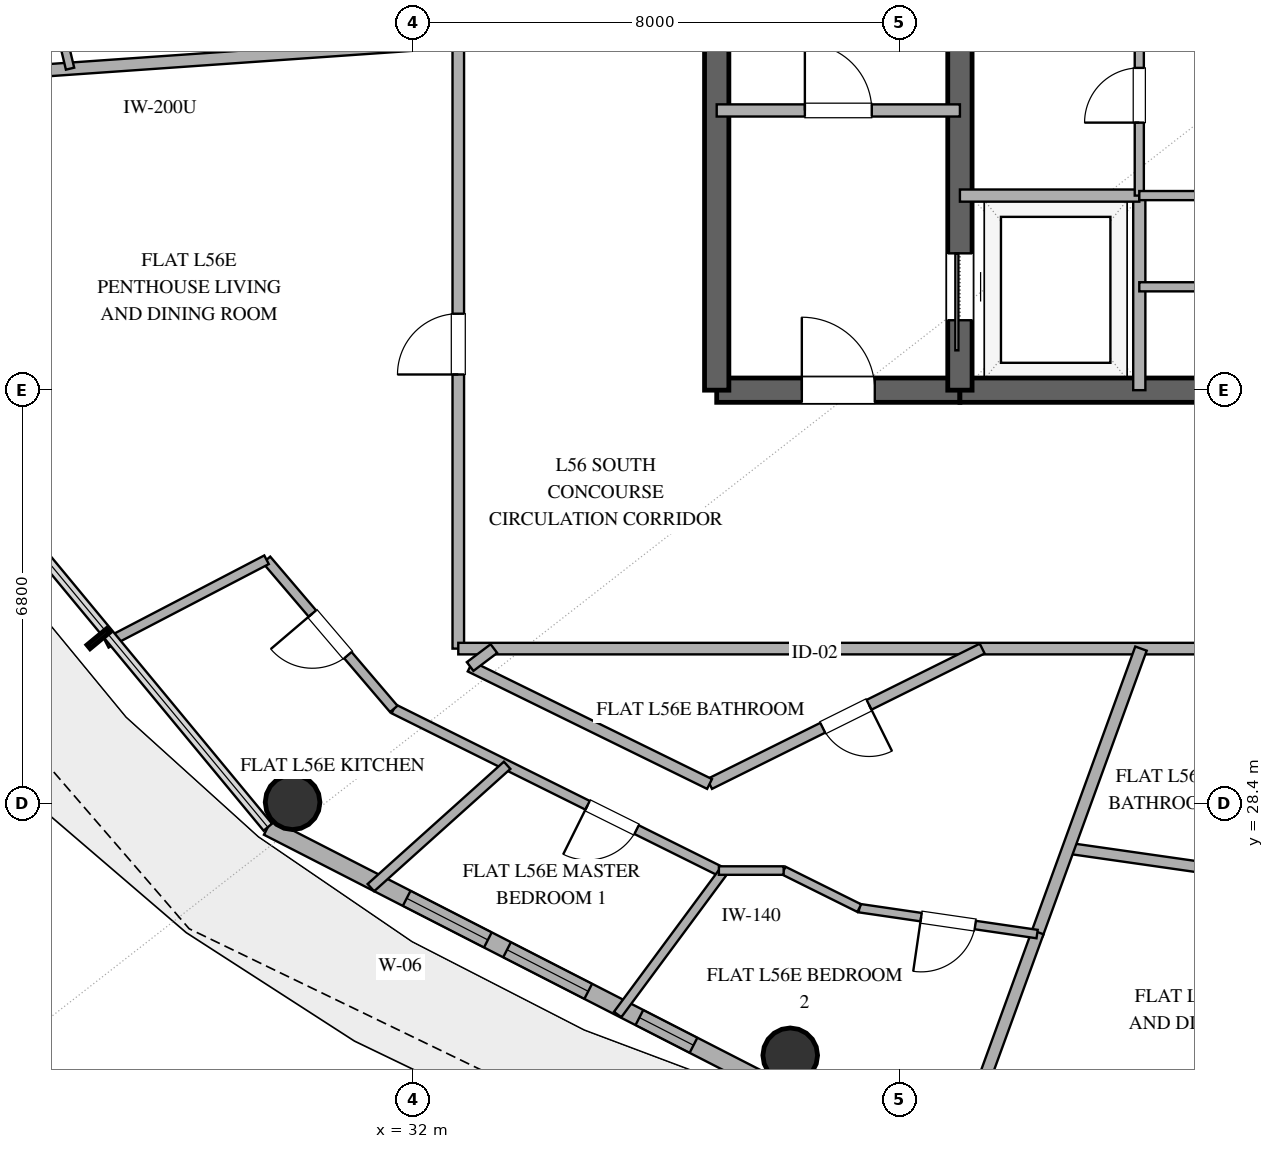
"""IFC4 building model, lengths in metres.
Left out: names, types, materials, properties, quantities, classifications, styles, units other than length and angle.
Written with IfcOpenShell. Run it as: python <this file> out.ifc"""

import sys

from ifc_helpers import new_model, si_unit, direction, frame, frame_2d, origin, origin_2d, place, context, subcontext, project, spatial, rectangle, hollow_circle, extrude, element, fill, save


model = new_model("IFC4")
c1 = context("Model", 3, precision=1e-05, world=origin(), true_north=direction((0.0, 1.0)))
c2 = subcontext(c1, "Body", "Model", "MODEL_VIEW")
j1 = project(units=[si_unit("LENGTHUNIT", "METRE"), si_unit("PLANEANGLEUNIT", "RADIAN")], contexts=[c1])
p1 = place(None, origin())
s1 = spatial("IfcSite", under=j1, at=p1, CompositionType="ELEMENT")
p2 = place(p1, origin())
s2 = spatial("IfcBuilding", under=s1, at=p2, CompositionType="ELEMENT")
p3 = place(p2, frame((0.0, 0.0, 220.8)))
s3 = spatial("IfcBuildingStorey", under=s2, at=p3, CompositionType="ELEMENT", Elevation=220.8)
p4 = place(p3, frame((37.0, 35.2, 0.0), z_axis=(0.0, 0.0, 1.0), x_axis=(1.0, 0.0, 0.0)))
e1 = element("IfcWall", 1, at=p4, inside=s3, PredefinedType="SHEAR", context=c2, shape_type="SweptSolid", body=[
    extrude(rectangle(XDim=4.0, YDim=0.4, at=frame_2d((2.0, 0.0))), origin(), (0.0, 0.0, 1.0), 3.36),
])
p5 = place(p4, frame((1.4, 0.0, 0.0)))
e2 = element("IfcOpeningElement", 2, at=p5, cuts=e1, PredefinedType="OPENING", context=c2, shape_type="SweptSolid", body=[
    extrude(rectangle(XDim=1.2, YDim=2.15, at=frame_2d((0.6, 1.075))), frame((0.0, 0.21, 0.0), z_axis=(0.0, -1.0, 0.0), x_axis=(1.0, 0.0, 0.0)), (0.0, 0.0, 1.0), 0.42),
])
p6 = place(p3, frame((41.0, 35.2, 0.0), z_axis=(0.0, 0.0, 1.0), x_axis=(1.0, 0.0, 0.0)))
e3 = element("IfcWall", 3, at=p6, inside=s3, PredefinedType="SHEAR", context=c2, shape_type="SweptSolid", body=[
    extrude(rectangle(XDim=14.0, YDim=0.4, at=frame_2d((7.0, 0.0))), origin(), (0.0, 0.0, 1.0), 3.36),
])
p7 = place(p6, frame((6.1, 0.0, 0.0)))
e4 = element("IfcOpeningElement", 4, at=p7, cuts=e3, PredefinedType="OPENING", context=c2, shape_type="SweptSolid", body=[
    extrude(rectangle(XDim=1.8, YDim=2.25, at=frame_2d((0.9, 1.125))), frame((0.0, 0.21, 0.0), z_axis=(0.0, -1.0, 0.0), x_axis=(1.0, 0.0, 0.0)), (0.0, 0.0, 1.0), 0.42),
])
p8 = place(p3, frame((37.0, 35.2, 0.0), z_axis=(0.0, 0.0, 1.0), x_axis=(0.0, 1.0, 0.0)))
e5 = element("IfcWall", 5, at=p8, inside=s3, PredefinedType="SHEAR", context=c2, shape_type="SweptSolid", body=[
    extrude(rectangle(XDim=13.6, YDim=0.4, at=frame_2d((6.8, 0.0))), origin(), (0.0, 0.0, 1.0), 3.36),
])
p9 = place(p3, frame((41.0, 35.2, 0.0), z_axis=(0.0, 0.0, 1.0), x_axis=(0.0, 1.0, 0.0)))
e6 = element("IfcWall", 6, at=p9, inside=s3, PredefinedType="SHEAR", context=c2, shape_type="SweptSolid", body=[
    extrude(rectangle(XDim=13.6, YDim=0.4, at=frame_2d((6.8, 0.0))), origin(), (0.0, 0.0, 1.0), 3.36),
])
p10 = place(p9, frame((1.15, 0.0, 0.0)))
e7 = element("IfcOpeningElement", 7, at=p10, cuts=e6, PredefinedType="OPENING", context=c2, shape_type="SweptSolid", body=[
    extrude(rectangle(XDim=1.1, YDim=2.2, at=frame_2d((0.55, 1.1))), frame((0.0, 0.21, 0.0), z_axis=(0.0, -1.0, 0.0), x_axis=(1.0, 0.0, 0.0)), (0.0, 0.0, 1.0), 0.42),
])
for number, where, z_axis, x_axis in (
    (8, (30.025, 28.424, 0.0), (0.0, 0.0, 1.0), (1.0, 0.0, 0.0)),
    (9, (38.209, 24.261, 0.0), (0.0, 0.0, 1.0), (1.0, 0.0, 0.0)),
):
    element("IfcColumn", number, at=place(p3, frame(where, z_axis=z_axis, x_axis=x_axis)), inside=s3, PredefinedType="COLUMN", context=c2, shape_type="SweptSolid", body=[
        extrude(hollow_circle(Radius=0.45, WallThickness=0.025, at=origin_2d()), origin(), (0.0, 0.0, 1.0), 3.36),
    ])
p11 = place(p3, frame((29.617, 28.013, 0.0), z_axis=(0.0, 0.0, 1.0), x_axis=(0.890007394051, -0.455946091699, 0.0)))
e10 = element("IfcWall", 10, at=p11, inside=s3, PredefinedType="SOLIDWALL", context=c2, shape_type="SweptSolid", body=[
    extrude(rectangle(XDim=9.404, YDim=0.28, at=frame_2d((4.702, 0.0))), origin(), (0.0, 0.0, 1.0), 3.36),
])
p12 = place(p11, frame((2.566, 0.0, 0.85)))
e11 = element("IfcOpeningElement", 11, at=p12, cuts=e10, PredefinedType="OPENING", context=c2, shape_type="SweptSolid", body=[
    extrude(rectangle(XDim=1.5, YDim=2.0, at=frame_2d((0.75, 1.0))), frame((0.0, 0.15, 0.0), z_axis=(0.0, -1.0, 0.0), x_axis=(1.0, 0.0, 0.0)), (0.0, 0.0, 1.0), 0.3),
])
p13 = place(p11, frame((4.421, 0.0, 0.85)))
e12 = element("IfcOpeningElement", 12, at=p13, cuts=e10, PredefinedType="OPENING", context=c2, shape_type="SweptSolid", body=[
    extrude(rectangle(XDim=1.5, YDim=2.0, at=frame_2d((0.75, 1.0))), frame((0.0, 0.15, 0.0), z_axis=(0.0, -1.0, 0.0), x_axis=(1.0, 0.0, 0.0)), (0.0, 0.0, 1.0), 0.3),
])
p14 = place(p11, frame((6.866, 0.0, 0.85)))
e13 = element("IfcOpeningElement", 13, at=p14, cuts=e10, PredefinedType="OPENING", context=c2, shape_type="SweptSolid", body=[
    extrude(rectangle(XDim=1.0, YDim=1.8, at=frame_2d((0.5, 0.9))), frame((0.0, 0.15, 0.0), z_axis=(0.0, -1.0, 0.0), x_axis=(1.0, 0.0, 0.0)), (0.0, 0.0, 1.0), 0.3),
])
p15 = place(p3, frame((37.0, 39.8, 0.0), z_axis=(0.0, 0.0, 1.0), x_axis=(1.0, 0.0, 0.0)))
e14 = element("IfcWall", 14, at=p15, inside=s3, PredefinedType="SOLIDWALL", context=c2, shape_type="SweptSolid", body=[
    extrude(rectangle(XDim=4.0, YDim=0.2, at=frame_2d((2.0, 0.0))), origin(), (0.0, 0.0, 1.0), 2.72),
])
p16 = place(p15, frame((1.45, 0.0, 0.0)))
e15 = element("IfcOpeningElement", 15, at=p16, cuts=e14, PredefinedType="OPENING", context=c2, shape_type="SweptSolid", body=[
    extrude(rectangle(XDim=1.1, YDim=2.15, at=frame_2d((0.55, 1.075))), frame((0.0, 0.11, 0.0), z_axis=(0.0, -1.0, 0.0), x_axis=(1.0, 0.0, 0.0)), (0.0, 0.0, 1.0), 0.22),
])
p17 = place(p3, frame((43.95, 35.2, 0.0), z_axis=(0.0, 0.0, 1.0), x_axis=(0.0, 1.0, 0.0)))
e16 = element("IfcWall", 16, at=p17, inside=s3, PredefinedType="SOLIDWALL", context=c2, shape_type="SweptSolid", body=[
    extrude(rectangle(XDim=3.2, YDim=0.2, at=frame_2d((1.6, 0.0))), origin(), (0.0, 0.0, 1.0), 2.72),
])
p18 = place(p3, frame((41.0, 38.4, 0.0), z_axis=(0.0, 0.0, 1.0), x_axis=(1.0, 0.0, 0.0)))
e17 = element("IfcWall", 17, at=p18, inside=s3, PredefinedType="SOLIDWALL", context=c2, shape_type="SweptSolid", body=[
    extrude(rectangle(XDim=2.95, YDim=0.2, at=frame_2d((1.475, 0.0))), origin(), (0.0, 0.0, 1.0), 2.72),
])
p19 = place(p3, frame((43.95, 38.4, 0.0), z_axis=(0.0, 0.0, 1.0), x_axis=(0.0, 1.0, 0.0)))
e18 = element("IfcWall", 18, at=p19, inside=s3, PredefinedType="PARTITIONING", context=c2, shape_type="SweptSolid", body=[
    extrude(rectangle(XDim=3.4, YDim=0.15, at=frame_2d((1.7, 0.0))), origin(), (0.0, 0.0, 1.0), 2.72),
])
p20 = place(p19, frame((1.2, 0.0, 0.0)))
e19 = element("IfcOpeningElement", 19, at=p20, cuts=e18, PredefinedType="OPENING", context=c2, shape_type="SweptSolid", body=[
    extrude(rectangle(XDim=0.9, YDim=2.15, at=frame_2d((0.45, 1.075))), frame((0.0, 0.085, 0.0), z_axis=(0.0, -1.0, 0.0), x_axis=(1.0, 0.0, 0.0)), (0.0, 0.0, 1.0), 0.17),
])
for number, where, z_axis, x_axis in (
    (20, (43.95, 36.9, 0.0), (0.0, 0.0, 1.0), (1.0, 0.0, 0.0)),
    (21, (43.95, 38.4, 0.0), (0.0, 0.0, 1.0), (1.0, 0.0, 0.0)),
):
    element("IfcWall", number, at=place(p3, frame(where, z_axis=z_axis, x_axis=x_axis)), inside=s3, PredefinedType="PARTITIONING", context=c2, shape_type="SweptSolid", body=[
        extrude(rectangle(XDim=2.05, YDim=0.15, at=frame_2d((1.025, 0.0))), origin(), (0.0, 0.0, 1.0), 2.72),
    ])
p21 = place(p3, frame((32.75, 30.95, 0.0), z_axis=(0.0, 0.0, 1.0), x_axis=(0.0, 1.0, 0.0)))
e22 = element("IfcWall", 22, at=p21, inside=s3, PredefinedType="PARTITIONING", context=c2, shape_type="SweptSolid", body=[
    extrude(rectangle(XDim=12.471, YDim=0.19, at=frame_2d((6.236, 0.0))), origin(), (0.0, 0.0, 1.0), 2.72),
])
p22 = place(p21, frame((4.508, 0.0, 0.0)))
e23 = element("IfcOpeningElement", 23, at=p22, cuts=e22, PredefinedType="OPENING", context=c2, shape_type="SweptSolid", body=[
    extrude(rectangle(XDim=1.0, YDim=2.2, at=frame_2d((0.5, 1.1))), frame((0.0, 0.105, 0.0), z_axis=(0.0, -1.0, 0.0), x_axis=(1.0, 0.0, 0.0)), (0.0, 0.0, 1.0), 0.21),
])
p23 = place(p3, frame((45.87, 30.95, 0.0), z_axis=(0.0, 0.0, 1.0), x_axis=(-1.0, 0.0, 0.0)))
e24 = element("IfcWall", 24, at=p23, inside=s3, PredefinedType="PARTITIONING", context=c2, shape_type="SweptSolid", body=[
    extrude(rectangle(XDim=13.12, YDim=0.19, at=frame_2d((6.56, 0.0))), origin(), (0.0, 0.0, 1.0), 2.72),
])
p24 = place(p3, frame((32.75, 40.934, 0.0), z_axis=(0.0, 0.0, 1.0), x_axis=(-0.997563620801, -0.069762615023, 0.0)))
e25 = element("IfcWall", 25, at=p24, inside=s3, PredefinedType="PARTITIONING", context=c2, shape_type="SweptSolid", body=[
    extrude(rectangle(XDim=9.935, YDim=0.2, at=frame_2d((4.968, 0.0))), origin(), (0.0, 0.0, 1.0), 2.72),
])
p25 = place(p3, frame((41.366, 30.95, 0.0), z_axis=(0.0, 0.0, 1.0), x_axis=(-0.895701232799, -0.444656385946, 0.0)))
e26 = element("IfcWall", 26, at=p25, inside=s3, PredefinedType="PLUMBINGWALL", context=c2, shape_type="SweptSolid", body=[
    extrude(rectangle(XDim=5.006, YDim=0.18, at=frame_2d((2.503, 0.0))), origin(), (0.0, 0.0, 1.0), 2.72),
])
p26 = place(p25, frame((2.078, 0.0, 0.0)))
e27 = element("IfcOpeningElement", 27, at=p26, cuts=e26, PredefinedType="OPENING", context=c2, shape_type="SweptSolid", body=[
    extrude(rectangle(XDim=0.85, YDim=2.1, at=frame_2d((0.425, 1.05))), frame((0.0, 0.1, 0.0), z_axis=(0.0, -1.0, 0.0), x_axis=(1.0, 0.0, 0.0)), (0.0, 0.0, 1.0), 0.2),
])
p27 = place(p3, frame((36.882, 28.724, 0.0), z_axis=(0.0, 0.0, 1.0), x_axis=(-0.897797301304, 0.440408907461, 0.0)))
e28 = element("IfcWall", 28, at=p27, inside=s3, PredefinedType="PLUMBINGWALL", context=c2, shape_type="SweptSolid", body=[
    extrude(rectangle(XDim=4.385, YDim=0.18, at=frame_2d((2.193, 0.0))), origin(), (0.0, 0.0, 1.0), 2.72),
])
p28 = place(p3, frame((37.036, 27.3, 0.0), z_axis=(0.0, 0.0, 1.0), x_axis=(-0.895471406875, 0.445119039661, 0.0)))
e29 = element("IfcWall", 29, at=p28, inside=s3, PredefinedType="PLUMBINGWALL", context=c2, shape_type="SweptSolid", body=[
    extrude(rectangle(XDim=5.971, YDim=0.16, at=frame_2d((2.986, 0.0))), origin(), (0.0, 0.0, 1.0), 2.72),
])
p29 = place(p28, frame((1.512, 0.0, 0.0)))
e30 = element("IfcOpeningElement", 30, at=p29, cuts=e29, PredefinedType="OPENING", context=c2, shape_type="SweptSolid", body=[
    extrude(rectangle(XDim=0.9, YDim=2.1, at=frame_2d((0.45, 1.05))), frame((0.0, 0.09, 0.0), z_axis=(0.0, -1.0, 0.0), x_axis=(1.0, 0.0, 0.0)), (0.0, 0.0, 1.0), 0.18),
])
p30 = place(p3, frame((42.783, 27.666, 0.0), z_axis=(0.0, 0.0, 1.0), x_axis=(0.989925187984, -0.141591391669, 0.0)))
e31 = element("IfcWall", 31, at=p30, inside=s3, PredefinedType="PLUMBINGWALL", context=c2, shape_type="SweptSolid", body=[
    extrude(rectangle(XDim=3.819, YDim=0.18, at=frame_2d((1.91, 0.0))), origin(), (0.0, 0.0, 1.0), 2.72),
])
p31 = place(p3, frame((43.978, 30.95, 0.0), z_axis=(0.0, 0.0, 1.0), x_axis=(-0.34200203284, -0.939699212266, 0.0)))
e32 = element("IfcWall", 32, at=p31, inside=s3, PredefinedType="PARTITIONING", context=c2, shape_type="SweptSolid", body=[
    extrude(rectangle(XDim=4.996, YDim=0.2, at=frame_2d((2.498, 0.0))), origin(), (0.0, 0.0, 1.0), 2.72),
])
p32 = place(p3, frame((41.133, 23.134, 0.0), z_axis=(0.0, 0.0, 1.0), x_axis=(0.342000121366, 0.939699907942, 0.0)))
e33 = element("IfcWall", 33, at=p32, inside=s3, PredefinedType="PARTITIONING", context=c2, shape_type="SweptSolid", body=[
    extrude(rectangle(XDim=3.355, YDim=0.2, at=frame_2d((1.678, 0.0))), origin(), (0.0, 0.0, 1.0), 2.72),
])
p33 = place(p3, frame((31.689, 29.958, 0.0), z_axis=(0.0, 0.0, 1.0), x_axis=(-0.649012353166, 0.760777868657, 0.0)))
e34 = element("IfcWall", 34, at=p33, inside=s3, PredefinedType="PLUMBINGWALL", context=c2, shape_type="SweptSolid", body=[
    extrude(rectangle(XDim=3.224, YDim=0.16, at=frame_2d((1.612, 0.0))), origin(), (0.0, 0.0, 1.0), 2.72),
])
p34 = place(p33, frame((1.162, 0.0, 0.0)))
e35 = element("IfcOpeningElement", 35, at=p34, cuts=e34, PredefinedType="OPENING", context=c2, shape_type="SweptSolid", body=[
    extrude(rectangle(XDim=0.9, YDim=2.1, at=frame_2d((0.45, 1.05))), frame((0.0, 0.09, 0.0), z_axis=(0.0, -1.0, 0.0), x_axis=(1.0, 0.0, 0.0)), (0.0, 0.0, 1.0), 0.18),
])
p35 = place(p3, frame((31.312, 27.019, 0.0), z_axis=(0.0, 0.0, 1.0), x_axis=(0.744144111532, 0.668019117445, 0.0)))
e36 = element("IfcWall", 36, at=p35, inside=s3, PredefinedType="PLUMBINGWALL", context=c2, shape_type="SweptSolid", body=[
    extrude(rectangle(XDim=3.011, YDim=0.16, at=frame_2d((1.506, 0.0))), origin(), (0.0, 0.0, 1.0), 2.72),
])
p36 = place(p3, frame((29.596, 32.411, 0.0), z_axis=(0.0, 0.0, 1.0), x_axis=(-0.886874801181, -0.462009834344, 0.0)))
e37 = element("IfcWall", 37, at=p36, inside=s3, PredefinedType="PLUMBINGWALL", context=c2, shape_type="SweptSolid", body=[
    extrude(rectangle(XDim=2.971, YDim=0.16, at=frame_2d((1.485, 0.0))), origin(), (0.0, 0.0, 1.0), 2.72),
])
p37 = place(p3, frame((42.27, 26.256, 0.0), z_axis=(0.0, 0.0, 1.0), x_axis=(-0.989530523264, 0.144323745545, 0.0)))
e38 = element("IfcWall", 38, at=p37, inside=s3, PredefinedType="PARTITIONING", context=c2, shape_type="SweptSolid", body=[
    extrude(rectangle(XDim=2.955, YDim=0.14, at=frame_2d((1.478, 0.0))), origin(), (0.0, 0.0, 1.0), 2.72),
])
p38 = place(p37, frame((1.028, 0.0, 0.0)))
e39 = element("IfcOpeningElement", 39, at=p38, cuts=e38, PredefinedType="OPENING", context=c2, shape_type="SweptSolid", body=[
    extrude(rectangle(XDim=0.9, YDim=2.1, at=frame_2d((0.45, 1.05))), frame((0.0, 0.08, 0.0), z_axis=(0.0, -1.0, 0.0), x_axis=(1.0, 0.0, 0.0)), (0.0, 0.0, 1.0), 0.16),
])
p39 = place(p3, frame((35.371, 24.933, 0.0), z_axis=(0.0, 0.0, 1.0), x_axis=(0.594787288624, 0.803883126637, 0.0)))
e40 = element("IfcWall", 40, at=p39, inside=s3, PredefinedType="PARTITIONING", context=c2, shape_type="SweptSolid", body=[
    extrude(rectangle(XDim=2.945, YDim=0.15, at=frame_2d((1.472, 0.0))), origin(), (0.0, 0.0, 1.0), 2.72),
])
p40 = place(p3, frame((26.004, 42.0, 0.0), z_axis=(0.0, 0.0, 1.0), x_axis=(0.232292411737, -0.972645996984, 0.0)))
e41 = element("IfcWall", 41, at=p40, inside=s3, PredefinedType="PARTITIONING", context=c2, shape_type="SweptSolid", body=[
    extrude(rectangle(XDim=1.555, YDim=0.14, at=frame_2d((0.778, 0.0))), origin(), (0.0, 0.0, 1.0), 2.72),
])
p41 = place(p3, frame((39.345, 26.682, 0.0), z_axis=(0.0, 0.0, 1.0), x_axis=(-0.895584310315, 0.444891833053, 0.0)))
e42 = element("IfcWall", 42, at=p41, inside=s3, PredefinedType="PARTITIONING", context=c2, shape_type="SweptSolid", body=[
    extrude(rectangle(XDim=1.389, YDim=0.14, at=frame_2d((0.694, 0.0))), origin(), (0.0, 0.0, 1.0), 2.72),
])
p42 = place(p3, frame((38.101, 27.3, 0.0), z_axis=(0.0, 0.0, 1.0), x_axis=(-1.0, 0.0, 0.0)))
e43 = element("IfcWall", 43, at=p42, inside=s3, PredefinedType="PARTITIONING", context=c2, shape_type="SweptSolid", body=[
    extrude(rectangle(XDim=1.065, YDim=0.14, at=frame_2d((0.533, 0.0))), origin(), (0.0, 0.0, 1.0), 2.72),
])
p43 = place(p3, frame((32.945, 30.655, 0.0), z_axis=(0.0, 0.0, 1.0), x_axis=(0.798681895285, 0.601753462927, 0.0)))
e44 = element("IfcWall", 44, at=p43, inside=s3, PredefinedType="PLUMBINGWALL", context=c2, shape_type="SweptSolid", body=[
    extrude(rectangle(XDim=0.49, YDim=0.18, at=frame_2d((0.245, 0.0))), origin(), (0.0, 0.0, 1.0), 2.72),
])
p44 = place(p12, origin())
e45 = element("IfcWindow", 45, at=p44, inside=s3, PartitioningType="SINGLE_PANEL", PredefinedType="WINDOW", context=c2, shape_type="SweptSolid", body=[
    extrude(rectangle(XDim=1.5, YDim=2.0, at=frame_2d((0.75, 1.0))), frame((0.0, 0.03, 0.0), z_axis=(0.0, -1.0, 0.0), x_axis=(1.0, 0.0, 0.0)), (0.0, 0.0, 1.0), 0.06),
])
fill(e11, e45)
p45 = place(p13, origin())
e46 = element("IfcWindow", 46, at=p45, inside=s3, PartitioningType="SINGLE_PANEL", PredefinedType="WINDOW", context=c2, shape_type="SweptSolid", body=[
    extrude(rectangle(XDim=1.5, YDim=2.0, at=frame_2d((0.75, 1.0))), frame((0.0, 0.03, 0.0), z_axis=(0.0, -1.0, 0.0), x_axis=(1.0, 0.0, 0.0)), (0.0, 0.0, 1.0), 0.06),
])
fill(e12, e46)
p46 = place(p14, origin())
e47 = element("IfcWindow", 47, at=p46, inside=s3, PartitioningType="SINGLE_PANEL", PredefinedType="WINDOW", context=c2, shape_type="SweptSolid", body=[
    extrude(rectangle(XDim=1.0, YDim=1.8, at=frame_2d((0.5, 0.9))), frame((0.0, 0.03, 0.0), z_axis=(0.0, -1.0, 0.0), x_axis=(1.0, 0.0, 0.0)), (0.0, 0.0, 1.0), 0.06),
])
fill(e13, e47)
p47 = place(p10, origin())
e48 = element("IfcDoor", 48, at=p47, inside=s3, OperationType="SLIDING_TO_LEFT", PredefinedType="DOOR", context=c2, shape_type="SweptSolid", body=[
    extrude(rectangle(XDim=1.1, YDim=2.2, at=frame_2d((0.55, 1.1))), frame((0.0, 0.025, 0.0), z_axis=(0.0, -1.0, 0.0), x_axis=(1.0, 0.0, 0.0)), (0.0, 0.0, 1.0), 0.05),
])
fill(e7, e48)
p48 = place(p5, origin())
e49 = element("IfcDoor", 49, at=p48, inside=s3, OperationType="SINGLE_SWING_LEFT", PredefinedType="DOOR", context=c2, shape_type="SweptSolid", body=[
    extrude(rectangle(XDim=1.2, YDim=2.15, at=frame_2d((0.6, 1.075))), frame((0.0, 0.025, 0.0), z_axis=(0.0, -1.0, 0.0), x_axis=(1.0, 0.0, 0.0)), (0.0, 0.0, 1.0), 0.05),
])
fill(e2, e49)
p49 = place(p16, origin())
e50 = element("IfcDoor", 50, at=p49, inside=s3, OperationType="SINGLE_SWING_LEFT", PredefinedType="DOOR", context=c2, shape_type="SweptSolid", body=[
    extrude(rectangle(XDim=1.1, YDim=2.15, at=frame_2d((0.55, 1.075))), frame((0.0, 0.025, 0.0), z_axis=(0.0, -1.0, 0.0), x_axis=(1.0, 0.0, 0.0)), (0.0, 0.0, 1.0), 0.05),
])
fill(e15, e50)
p50 = place(p20, origin())
e51 = element("IfcDoor", 51, at=p50, inside=s3, OperationType="SINGLE_SWING_LEFT", PredefinedType="DOOR", context=c2, shape_type="SweptSolid", body=[
    extrude(rectangle(XDim=0.9, YDim=2.15, at=frame_2d((0.45, 1.075))), frame((0.0, 0.025, 0.0), z_axis=(0.0, -1.0, 0.0), x_axis=(1.0, 0.0, 0.0)), (0.0, 0.0, 1.0), 0.05),
])
fill(e19, e51)
p51 = place(p22, origin())
e52 = element("IfcDoor", 52, at=p51, inside=s3, OperationType="SINGLE_SWING_LEFT", PredefinedType="DOOR", context=c2, shape_type="SweptSolid", body=[
    extrude(rectangle(XDim=1.0, YDim=2.2, at=frame_2d((0.5, 1.1))), frame((0.0, 0.025, 0.0), z_axis=(0.0, -1.0, 0.0), x_axis=(1.0, 0.0, 0.0)), (0.0, 0.0, 1.0), 0.05),
])
fill(e23, e52)
p52 = place(p26, origin())
e53 = element("IfcDoor", 53, at=p52, inside=s3, OperationType="SINGLE_SWING_LEFT", PredefinedType="DOOR", context=c2, shape_type="SweptSolid", body=[
    extrude(rectangle(XDim=0.85, YDim=2.1, at=frame_2d((0.425, 1.05))), frame((0.0, 0.025, 0.0), z_axis=(0.0, -1.0, 0.0), x_axis=(1.0, 0.0, 0.0)), (0.0, 0.0, 1.0), 0.05),
])
fill(e27, e53)
p53 = place(p29, origin())
e54 = element("IfcDoor", 54, at=p53, inside=s3, OperationType="SINGLE_SWING_RIGHT", PredefinedType="DOOR", context=c2, shape_type="SweptSolid", body=[
    extrude(rectangle(XDim=0.9, YDim=2.1, at=frame_2d((0.45, 1.05))), frame((0.0, 0.025, 0.0), z_axis=(0.0, -1.0, 0.0), x_axis=(1.0, 0.0, 0.0)), (0.0, 0.0, 1.0), 0.05),
])
fill(e30, e54)
p54 = place(p34, origin())
e55 = element("IfcDoor", 55, at=p54, inside=s3, OperationType="SINGLE_SWING_RIGHT", PredefinedType="DOOR", context=c2, shape_type="SweptSolid", body=[
    extrude(rectangle(XDim=0.9, YDim=2.1, at=frame_2d((0.45, 1.05))), frame((0.0, 0.025, 0.0), z_axis=(0.0, -1.0, 0.0), x_axis=(1.0, 0.0, 0.0)), (0.0, 0.0, 1.0), 0.05),
])
fill(e35, e55)
p55 = place(p38, origin())
e56 = element("IfcDoor", 56, at=p55, inside=s3, OperationType="SINGLE_SWING_RIGHT", PredefinedType="DOOR", context=c2, shape_type="SweptSolid", body=[
    extrude(rectangle(XDim=0.9, YDim=2.1, at=frame_2d((0.45, 1.05))), frame((0.0, 0.025, 0.0), z_axis=(0.0, -1.0, 0.0), x_axis=(1.0, 0.0, 0.0)), (0.0, 0.0, 1.0), 0.05),
])
fill(e39, e56)
save(model, sys.argv[1])
